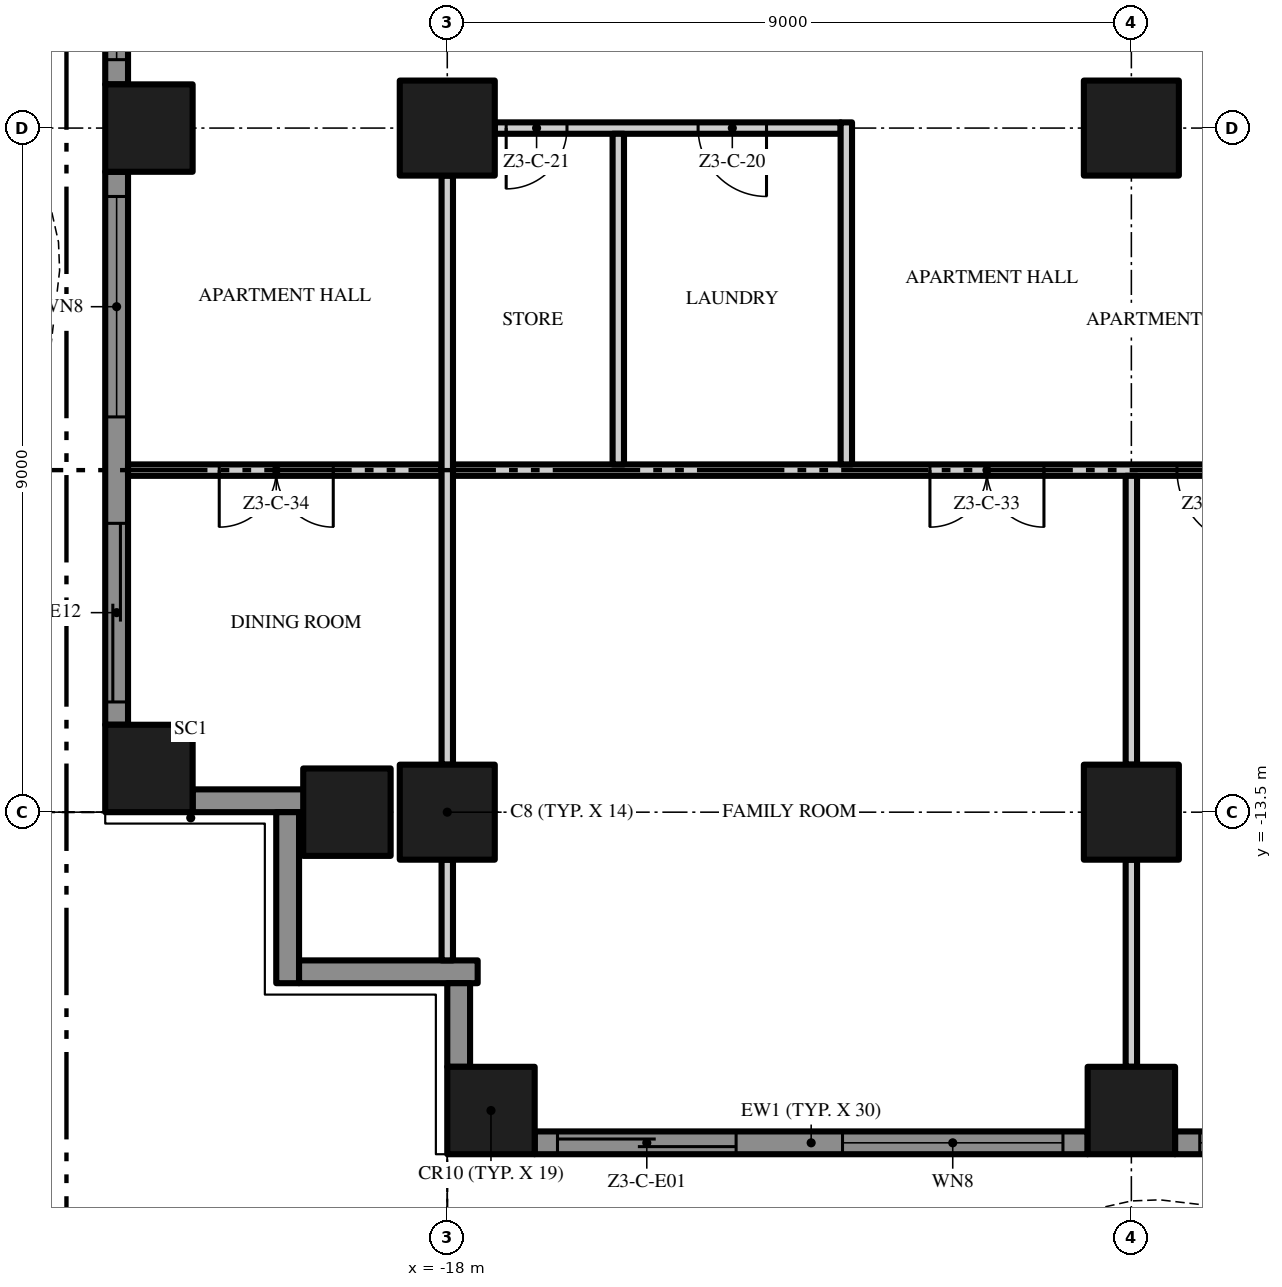
"""IFC4 building model, lengths in metres.
Left out: names, types, materials, properties, quantities, classifications, styles, units other than length and angle.
Written with IfcOpenShell. Run it as: python <this file> out.ifc"""

import sys

from ifc_helpers import new_model, si_unit, direction, frame, frame_2d, origin, origin_2d, place, context, subcontext, project, spatial, polyline, rectangle, outline, extrude, element, fill, save


model = new_model("IFC4")
c1 = context("Model", 3, precision=1e-05, world=origin(), true_north=direction((0.0, 1.0)))
c2 = subcontext(c1, "Body", "Model", "MODEL_VIEW")
j1 = project(units=[si_unit("LENGTHUNIT", "METRE"), si_unit("PLANEANGLEUNIT", "RADIAN")], contexts=[c1])
p1 = place(None, origin())
s1 = spatial("IfcSite", under=j1, at=p1, CompositionType="ELEMENT")
p2 = place(p1, origin())
s2 = spatial("IfcBuilding", under=s1, at=p2, CompositionType="ELEMENT")
p3 = place(p2, frame((0.0, 0.0, 147.8)))
s3 = spatial("IfcBuildingStorey", under=s2, at=p3, CompositionType="ELEMENT", Elevation=147.8)
p4 = place(p3, frame((-18.0, -13.5, 0.0), z_axis=(0.0, 0.0, 1.0), x_axis=(1.0, 0.0, 0.0)))
e1 = element("IfcColumn", 1, at=p4, inside=s3, PredefinedType="COLUMN", context=c2, shape_type="SweptSolid", body=[
    extrude(rectangle(XDim=1.25, YDim=1.25, at=origin_2d()), origin(), (0.0, 0.0, 1.0), 3.5),
])
p5 = place(p3, frame((-17.425, -17.425, 0.0), z_axis=(0.0, 0.0, 1.0), x_axis=(1.0, 0.0, 0.0)))
e2 = element("IfcColumn", 2, at=p5, inside=s3, PredefinedType="COLUMN", context=c2, shape_type="SweptSolid", body=[
    extrude(rectangle(XDim=1.15, YDim=1.15, at=origin_2d()), origin(), (0.0, 0.0, 1.0), 3.5),
])
p6 = place(p3, frame((-18.0, -4.5, 0.0), z_axis=(0.0, 0.0, 1.0), x_axis=(1.0, 0.0, 0.0)))
e3 = element("IfcColumn", 3, at=p6, inside=s3, PredefinedType="COLUMN", context=c2, shape_type="SweptSolid", body=[
    extrude(rectangle(XDim=1.25, YDim=1.25, at=origin_2d()), origin(), (0.0, 0.0, 1.0), 3.5),
])
for number, where, z_axis, x_axis in (
    (4, (-21.925, -12.925, 0.0), (0.0, 0.0, 1.0), (1.0, 0.0, 0.0)),
    (5, (-19.32, -13.5, 0.0), (0.0, 0.0, 1.0), (1.0, 0.0, 0.0)),
    (6, (-21.925, -4.5, 0.0), (0.0, 0.0, 1.0), (1.0, 0.0, 0.0)),
):
    element("IfcColumn", number, at=place(p3, frame(where, z_axis=z_axis, x_axis=x_axis)), inside=s3, PredefinedType="COLUMN", context=c2, shape_type="SweptSolid", body=[
        extrude(rectangle(XDim=1.15, YDim=1.15, at=origin_2d()), origin(), (0.0, 0.0, 1.0), 3.5),
    ])
p7 = place(p3, frame((-9.0, -13.5, 0.0), z_axis=(0.0, 0.0, 1.0), x_axis=(1.0, 0.0, 0.0)))
e7 = element("IfcColumn", 7, at=p7, inside=s3, PredefinedType="COLUMN", context=c2, shape_type="SweptSolid", body=[
    extrude(rectangle(XDim=1.25, YDim=1.25, at=origin_2d()), origin(), (0.0, 0.0, 1.0), 3.5),
])
p8 = place(p3, frame((-9.0, -17.425, 0.0), z_axis=(0.0, 0.0, 1.0), x_axis=(1.0, 0.0, 0.0)))
e8 = element("IfcColumn", 8, at=p8, inside=s3, PredefinedType="COLUMN", context=c2, shape_type="SweptSolid", body=[
    extrude(rectangle(XDim=1.15, YDim=1.15, at=origin_2d()), origin(), (0.0, 0.0, 1.0), 3.5),
])
p9 = place(p3, frame((-9.0, -4.5, 0.0), z_axis=(0.0, 0.0, 1.0), x_axis=(1.0, 0.0, 0.0)))
e9 = element("IfcColumn", 9, at=p9, inside=s3, PredefinedType="COLUMN", context=c2, shape_type="SweptSolid", body=[
    extrude(rectangle(XDim=1.25, YDim=1.25, at=origin_2d()), origin(), (0.0, 0.0, 1.0), 3.5),
])
p10 = place(p3, frame((-9.575, -17.85, 0.0), z_axis=(0.0, 0.0, 1.0), x_axis=(-1.0, 0.0, 0.0)))
e10 = element("IfcWall", 10, at=p10, inside=s3, PredefinedType="SOLIDWALL", context=c2, shape_type="SweptSolid", body=[
    extrude(rectangle(XDim=7.275, YDim=0.3, at=frame_2d((3.638, 0.0))), origin(), (0.0, 0.0, 1.0), 3.5),
])
p11 = place(p10, frame((4.625, 0.0, 0.0)))
e11 = element("IfcOpeningElement", 11, at=p11, cuts=e10, PredefinedType="OPENING", context=c2, shape_type="SweptSolid", body=[
    extrude(rectangle(XDim=2.35, YDim=2.4, at=frame_2d((1.175, 1.2))), frame((0.0, 0.16, 0.0), z_axis=(0.0, -1.0, 0.0), x_axis=(1.0, 0.0, 0.0)), (0.0, 0.0, 1.0), 0.32),
])
p12 = place(p10, frame((0.325, 0.0, 0.45)))
e12 = element("IfcOpeningElement", 12, at=p12, cuts=e10, PredefinedType="OPENING", context=c2, shape_type="SweptSolid", body=[
    extrude(rectangle(XDim=2.9, YDim=2.65, at=frame_2d((1.45, 1.325))), frame((0.0, 0.16, 0.0), z_axis=(0.0, -1.0, 0.0), x_axis=(1.0, 0.0, 0.0)), (0.0, 0.0, 1.0), 0.32),
])
p13 = place(p3, frame((-0.575, -17.85, 0.0), z_axis=(0.0, 0.0, 1.0), x_axis=(-1.0, 0.0, 0.0)))
e13 = element("IfcWall", 13, at=p13, inside=s3, PredefinedType="SOLIDWALL", context=c2, shape_type="SweptSolid", body=[
    extrude(rectangle(XDim=7.85, YDim=0.3, at=frame_2d((3.925, 0.0))), origin(), (0.0, 0.0, 1.0), 3.5),
])
p14 = place(p13, frame((4.625, 0.0, 0.45)))
e14 = element("IfcOpeningElement", 14, at=p14, cuts=e13, PredefinedType="OPENING", context=c2, shape_type="SweptSolid", body=[
    extrude(rectangle(XDim=2.9, YDim=2.65, at=frame_2d((1.45, 1.325))), frame((0.0, 0.16, 0.0), z_axis=(0.0, -1.0, 0.0), x_axis=(1.0, 0.0, 0.0)), (0.0, 0.0, 1.0), 0.32),
])
p15 = place(p13, frame((0.325, 0.0, 0.0)))
e15 = element("IfcOpeningElement", 15, at=p15, cuts=e13, PredefinedType="OPENING", context=c2, shape_type="SweptSolid", body=[
    extrude(rectangle(XDim=2.9, YDim=2.4, at=frame_2d((1.45, 1.2))), frame((0.0, 0.16, 0.0), z_axis=(0.0, -1.0, 0.0), x_axis=(1.0, 0.0, 0.0)), (0.0, 0.0, 1.0), 0.32),
])
p16 = place(p3, frame((-22.35, -3.925, 0.0), z_axis=(0.0, 0.0, 1.0), x_axis=(0.0, 1.0, 0.0)))
e16 = element("IfcWall", 16, at=p16, inside=s3, PredefinedType="SOLIDWALL", context=c2, shape_type="SweptSolid", body=[
    extrude(rectangle(XDim=7.85, YDim=0.3, at=frame_2d((3.925, 0.0))), origin(), (0.0, 0.0, 1.0), 3.5),
])
p17 = place(p16, frame((4.625, 0.0, 0.0)))
e17 = element("IfcOpeningElement", 17, at=p17, cuts=e16, PredefinedType="OPENING", context=c2, shape_type="SweptSolid", body=[
    extrude(rectangle(XDim=2.9, YDim=2.4, at=frame_2d((1.45, 1.2))), frame((0.0, 0.16, 0.0), z_axis=(0.0, -1.0, 0.0), x_axis=(1.0, 0.0, 0.0)), (0.0, 0.0, 1.0), 0.32),
])
p18 = place(p16, frame((0.325, 0.0, 0.45)))
e18 = element("IfcOpeningElement", 18, at=p18, cuts=e16, PredefinedType="OPENING", context=c2, shape_type="SweptSolid", body=[
    extrude(rectangle(XDim=2.9, YDim=2.65, at=frame_2d((1.45, 1.325))), frame((0.0, 0.16, 0.0), z_axis=(0.0, -1.0, 0.0), x_axis=(1.0, 0.0, 0.0)), (0.0, 0.0, 1.0), 0.32),
])
p19 = place(p3, frame((-22.35, -12.35, 0.0), z_axis=(0.0, 0.0, 1.0), x_axis=(0.0, 1.0, 0.0)))
e19 = element("IfcWall", 19, at=p19, inside=s3, PredefinedType="SOLIDWALL", context=c2, shape_type="SweptSolid", body=[
    extrude(rectangle(XDim=7.275, YDim=0.3, at=frame_2d((3.638, 0.0))), origin(), (0.0, 0.0, 1.0), 3.5),
])
p20 = place(p19, frame((4.05, 0.0, 0.45)))
e20 = element("IfcOpeningElement", 20, at=p20, cuts=e19, PredefinedType="OPENING", context=c2, shape_type="SweptSolid", body=[
    extrude(rectangle(XDim=2.9, YDim=2.65, at=frame_2d((1.45, 1.325))), frame((0.0, 0.16, 0.0), z_axis=(0.0, -1.0, 0.0), x_axis=(1.0, 0.0, 0.0)), (0.0, 0.0, 1.0), 0.32),
])
p21 = place(p19, frame((0.3, 0.0, 0.0)))
e21 = element("IfcOpeningElement", 21, at=p21, cuts=e19, PredefinedType="OPENING", context=c2, shape_type="SweptSolid", body=[
    extrude(rectangle(XDim=2.35, YDim=2.4, at=frame_2d((1.175, 1.2))), frame((0.0, 0.16, 0.0), z_axis=(0.0, -1.0, 0.0), x_axis=(1.0, 0.0, 0.0)), (0.0, 0.0, 1.0), 0.32),
])
p22 = place(p3, frame((-19.85, -13.35, 0.0), z_axis=(0.0, 0.0, 1.0), x_axis=(-1.0, 0.0, 0.0)))
e22 = element("IfcWall", 22, at=p22, inside=s3, PredefinedType="SOLIDWALL", context=c2, shape_type="SweptSolid", body=[
    extrude(rectangle(XDim=1.5, YDim=0.3, at=frame_2d((0.75, 0.0))), origin(), (0.0, 0.0, 1.0), 3.5),
])
p23 = place(p3, frame((-20.1, -15.75, 0.0), z_axis=(0.0, 0.0, 1.0), x_axis=(0.0, 1.0, 0.0)))
e23 = element("IfcWall", 23, at=p23, inside=s3, PredefinedType="SOLIDWALL", context=c2, shape_type="SweptSolid", body=[
    extrude(rectangle(XDim=2.25, YDim=0.3, at=frame_2d((1.125, 0.0))), origin(), (0.0, 0.0, 1.0), 3.5),
])
p24 = place(p3, frame((-17.6, -15.6, 0.0), z_axis=(0.0, 0.0, 1.0), x_axis=(-1.0, 0.0, 0.0)))
e24 = element("IfcWall", 24, at=p24, inside=s3, PredefinedType="SOLIDWALL", context=c2, shape_type="SweptSolid", body=[
    extrude(rectangle(XDim=2.35, YDim=0.3, at=frame_2d((1.175, 0.0))), origin(), (0.0, 0.0, 1.0), 3.5),
])
p25 = place(p3, frame((-17.85, -16.85, 0.0), z_axis=(0.0, 0.0, 1.0), x_axis=(0.0, 1.0, 0.0)))
e25 = element("IfcWall", 25, at=p25, inside=s3, PredefinedType="SOLIDWALL", context=c2, shape_type="SweptSolid", body=[
    extrude(rectangle(XDim=1.1, YDim=0.3, at=frame_2d((0.55, 0.0))), origin(), (0.0, 0.0, 1.0), 3.5),
])
p26 = place(p3, origin())
e26 = element("IfcWall", 26, at=p26, inside=s3, PredefinedType="USERDEFINED", context=c2, shape_type="SweptSolid", body=[
    extrude(outline(polyline([(-18.0, -20.649), (-16.5, -20.985), (-16.125, -21.0), (-15.0, -20.869), (-13.5, -20.345), (-12.0, -19.612), (-10.5, -18.951), (-9.0, -18.615), (-8.625, -18.6), (-7.5, -18.731), (-6.0, -19.255), (-4.5, -19.988), (-3.0, -20.649), (-1.5, -20.985), (-1.125, -21.0), (0.0, -20.869), (1.5, -20.345), (3.0, -19.612), (4.5, -18.951), (6.0, -18.615), (6.375, -18.6), (7.5, -18.731), (9.0, -19.255), (10.5, -19.988), (12.0, -20.649), (13.5, -20.985), (13.875, -21.0), (15.0, -20.869), (16.5, -20.345), (18.0, -19.612), (17.89, -19.388), (16.404, -20.114), (14.944, -20.624), (13.865, -20.749), (13.533, -20.736), (12.079, -20.41), (10.605, -19.761), (9.096, -19.024), (7.556, -18.486), (6.385, -18.349), (5.967, -18.366), (4.421, -18.713), (2.895, -19.385), (1.404, -20.114), (-0.056, -20.624), (-1.135, -20.749), (-1.467, -20.736), (-2.921, -20.41), (-4.395, -19.761), (-5.904, -19.024), (-7.444, -18.486), (-8.615, -18.349), (-9.033, -18.366), (-10.579, -18.713), (-12.105, -19.385), (-13.596, -20.114), (-15.056, -20.624), (-16.135, -20.749), (-16.467, -20.736), (-17.945, -20.405), (-18.0, -20.649)])), origin(), (0.0, 0.0, 1.0), 0.9),
])
p27 = place(p3, origin())
e27 = element("IfcWall", 27, at=p27, inside=s3, PredefinedType="USERDEFINED", context=c2, shape_type="SweptSolid", body=[
    extrude(outline(polyline([(-25.149, 18.0), (-25.485, 16.5), (-25.5, 16.125), (-25.369, 15.0), (-24.845, 13.5), (-24.112, 12.0), (-23.451, 10.5), (-23.115, 9.0), (-23.1, 8.625), (-23.231, 7.5), (-23.755, 6.0), (-24.488, 4.5), (-25.149, 3.0), (-25.485, 1.5), (-25.5, 1.125), (-25.369, 0.0), (-24.845, -1.5), (-24.112, -3.0), (-23.451, -4.5), (-23.115, -6.0), (-23.1, -6.375), (-23.231, -7.5), (-23.755, -9.0), (-24.488, -10.5), (-25.149, -12.0), (-25.485, -13.5), (-25.241, -13.555), (-24.91, -12.079), (-24.261, -10.605), (-23.524, -9.096), (-22.986, -7.556), (-22.849, -6.385), (-22.866, -5.967), (-23.213, -4.421), (-23.885, -2.895), (-24.614, -1.404), (-25.124, 0.056), (-25.249, 1.135), (-25.236, 1.467), (-24.91, 2.921), (-24.261, 4.395), (-23.524, 5.904), (-22.986, 7.444), (-22.849, 8.615), (-22.866, 9.033), (-23.213, 10.579), (-23.885, 12.105), (-24.614, 13.596), (-25.124, 15.056), (-25.249, 16.135), (-25.236, 16.467), (-24.905, 17.945), (-25.149, 18.0)])), origin(), (0.0, 0.0, 1.0), 0.9),
])
p28 = place(p3, frame((-18.075, -9.0, 0.0), z_axis=(0.0, 0.0, 1.0), x_axis=(-1.0, 0.0, 0.0)))
e28 = element("IfcWall", 28, at=p28, inside=s3, PredefinedType="PARTITIONING", context=c2, shape_type="SweptSolid", body=[
    extrude(rectangle(XDim=4.125, YDim=0.15, at=frame_2d((2.062, 0.0))), origin(), (0.0, 0.0, 1.0), 3.5),
])
p29 = place(p28, frame((1.425, 0.0, 0.0)))
e29 = element("IfcOpeningElement", 29, at=p29, cuts=e28, PredefinedType="OPENING", context=c2, shape_type="SweptSolid", body=[
    extrude(rectangle(XDim=1.5, YDim=2.4, at=frame_2d((0.75, 1.2))), frame((0.0, 0.085, 0.0), z_axis=(0.0, -1.0, 0.0), x_axis=(1.0, 0.0, 0.0)), (0.0, 0.0, 1.0), 0.17),
])
p30 = place(p3, frame((-6.825, -9.0, 0.0), z_axis=(0.0, 0.0, 1.0), x_axis=(-1.0, 0.0, 0.0)))
e30 = element("IfcWall", 30, at=p30, inside=s3, PredefinedType="PARTITIONING", context=c2, shape_type="SweptSolid", body=[
    extrude(rectangle(XDim=11.1, YDim=0.15, at=frame_2d((5.55, 0.0))), origin(), (0.0, 0.0, 1.0), 3.5),
])
p31 = place(p30, frame((0.575, 0.0, 0.0)))
e31 = element("IfcOpeningElement", 31, at=p31, cuts=e30, PredefinedType="OPENING", context=c2, shape_type="SweptSolid", body=[
    extrude(rectangle(XDim=1.0, YDim=2.4, at=frame_2d((0.5, 1.2))), frame((0.0, 0.085, 0.0), z_axis=(0.0, -1.0, 0.0), x_axis=(1.0, 0.0, 0.0)), (0.0, 0.0, 1.0), 0.17),
])
p32 = place(p30, frame((3.325, 0.0, 0.0)))
e32 = element("IfcOpeningElement", 32, at=p32, cuts=e30, PredefinedType="OPENING", context=c2, shape_type="SweptSolid", body=[
    extrude(rectangle(XDim=1.5, YDim=2.4, at=frame_2d((0.75, 1.2))), frame((0.0, 0.085, 0.0), z_axis=(0.0, -1.0, 0.0), x_axis=(1.0, 0.0, 0.0)), (0.0, 0.0, 1.0), 0.17),
])
p33 = place(p3, frame((-12.825, -4.5, 0.0), z_axis=(0.0, 0.0, 1.0), x_axis=(-1.0, 0.0, 0.0)))
e33 = element("IfcWall", 33, at=p33, inside=s3, PredefinedType="PARTITIONING", context=c2, shape_type="SweptSolid", body=[
    extrude(rectangle(XDim=4.55, YDim=0.15, at=frame_2d((2.275, 0.0))), origin(), (0.0, 0.0, 1.0), 3.5),
])
p34 = place(p33, frame((0.975, 0.0, 0.0)))
e34 = element("IfcOpeningElement", 34, at=p34, cuts=e33, PredefinedType="OPENING", context=c2, shape_type="SweptSolid", body=[
    extrude(rectangle(XDim=0.9, YDim=2.1, at=frame_2d((0.45, 1.05))), frame((0.0, 0.085, 0.0), z_axis=(0.0, -1.0, 0.0), x_axis=(1.0, 0.0, 0.0)), (0.0, 0.0, 1.0), 0.17),
])
p35 = place(p33, frame((3.6, 0.0, 0.0)))
e35 = element("IfcOpeningElement", 35, at=p35, cuts=e33, PredefinedType="OPENING", context=c2, shape_type="SweptSolid", body=[
    extrude(rectangle(XDim=0.8, YDim=2.0, at=frame_2d((0.4, 1.0))), frame((0.0, 0.085, 0.0), z_axis=(0.0, -1.0, 0.0), x_axis=(1.0, 0.0, 0.0)), (0.0, 0.0, 1.0), 0.17),
])
p36 = place(p3, frame((-18.0, -15.45, 0.0), z_axis=(0.0, 0.0, 1.0), x_axis=(0.0, 1.0, 0.0)))
e36 = element("IfcWall", 36, at=p36, inside=s3, PredefinedType="PARTITIONING", context=c2, shape_type="SweptSolid", body=[
    extrude(rectangle(XDim=1.325, YDim=0.15, at=frame_2d((0.662, 0.0))), origin(), (0.0, 0.0, 1.0), 3.5),
])
p37 = place(p3, frame((-18.0, -12.875, 0.0), z_axis=(0.0, 0.0, 1.0), x_axis=(0.0, 1.0, 0.0)))
e37 = element("IfcWall", 37, at=p37, inside=s3, PredefinedType="PARTITIONING", context=c2, shape_type="SweptSolid", body=[
    extrude(rectangle(XDim=7.75, YDim=0.15, at=frame_2d((3.875, 0.0))), origin(), (0.0, 0.0, 1.0), 3.5),
])
p38 = place(p3, frame((-15.75, -8.925, 0.0), z_axis=(0.0, 0.0, 1.0), x_axis=(0.0, 1.0, 0.0)))
e38 = element("IfcWall", 38, at=p38, inside=s3, PredefinedType="PARTITIONING", context=c2, shape_type="SweptSolid", body=[
    extrude(rectangle(XDim=4.35, YDim=0.15, at=frame_2d((2.175, 0.0))), origin(), (0.0, 0.0, 1.0), 3.5),
])
p39 = place(p3, frame((-12.75, -8.925, 0.0), z_axis=(0.0, 0.0, 1.0), x_axis=(0.0, 1.0, 0.0)))
e39 = element("IfcWall", 39, at=p39, inside=s3, PredefinedType="PARTITIONING", context=c2, shape_type="SweptSolid", body=[
    extrude(rectangle(XDim=4.5, YDim=0.15, at=frame_2d((2.25, 0.0))), origin(), (0.0, 0.0, 1.0), 3.5),
])
p40 = place(p3, frame((-9.0, -16.85, 0.0), z_axis=(0.0, 0.0, 1.0), x_axis=(0.0, 1.0, 0.0)))
e40 = element("IfcWall", 40, at=p40, inside=s3, PredefinedType="PARTITIONING", context=c2, shape_type="SweptSolid", body=[
    extrude(rectangle(XDim=2.725, YDim=0.15, at=frame_2d((1.363, 0.0))), origin(), (0.0, 0.0, 1.0), 3.5),
])
p41 = place(p3, frame((-9.0, -12.875, 0.0), z_axis=(0.0, 0.0, 1.0), x_axis=(0.0, 1.0, 0.0)))
e41 = element("IfcWall", 41, at=p41, inside=s3, PredefinedType="PARTITIONING", context=c2, shape_type="SweptSolid", body=[
    extrude(rectangle(XDim=3.8, YDim=0.15, at=frame_2d((1.9, 0.0))), origin(), (0.0, 0.0, 1.0), 3.5),
])
p42 = place(p11, origin())
e42 = element("IfcDoor", 42, at=p42, inside=s3, OperationType="SINGLE_SWING_LEFT", PredefinedType="DOOR", context=c2, shape_type="SweptSolid", body=[
    extrude(rectangle(XDim=2.35, YDim=2.4, at=frame_2d((1.175, 1.2))), frame((0.0, 0.025, 0.0), z_axis=(0.0, -1.0, 0.0), x_axis=(1.0, 0.0, 0.0)), (0.0, 0.0, 1.0), 0.05),
])
fill(e11, e42)
p43 = place(p12, origin())
e43 = element("IfcWindow", 43, at=p43, inside=s3, PartitioningType="SINGLE_PANEL", PredefinedType="WINDOW", context=c2, shape_type="SweptSolid", body=[
    extrude(rectangle(XDim=2.9, YDim=2.65, at=frame_2d((1.45, 1.325))), frame((0.0, 0.03, 0.0), z_axis=(0.0, -1.0, 0.0), x_axis=(1.0, 0.0, 0.0)), (0.0, 0.0, 1.0), 0.06),
])
fill(e12, e43)
p44 = place(p14, origin())
e44 = element("IfcWindow", 44, at=p44, inside=s3, PartitioningType="SINGLE_PANEL", PredefinedType="WINDOW", context=c2, shape_type="SweptSolid", body=[
    extrude(rectangle(XDim=2.9, YDim=2.65, at=frame_2d((1.45, 1.325))), frame((0.0, 0.03, 0.0), z_axis=(0.0, -1.0, 0.0), x_axis=(1.0, 0.0, 0.0)), (0.0, 0.0, 1.0), 0.06),
])
fill(e14, e44)
p45 = place(p18, origin())
e45 = element("IfcWindow", 45, at=p45, inside=s3, PartitioningType="SINGLE_PANEL", PredefinedType="WINDOW", context=c2, shape_type="SweptSolid", body=[
    extrude(rectangle(XDim=2.9, YDim=2.65, at=frame_2d((1.45, 1.325))), frame((0.0, 0.03, 0.0), z_axis=(0.0, -1.0, 0.0), x_axis=(1.0, 0.0, 0.0)), (0.0, 0.0, 1.0), 0.06),
])
fill(e18, e45)
p46 = place(p20, origin())
e46 = element("IfcWindow", 46, at=p46, inside=s3, PartitioningType="SINGLE_PANEL", PredefinedType="WINDOW", context=c2, shape_type="SweptSolid", body=[
    extrude(rectangle(XDim=2.9, YDim=2.65, at=frame_2d((1.45, 1.325))), frame((0.0, 0.03, 0.0), z_axis=(0.0, -1.0, 0.0), x_axis=(1.0, 0.0, 0.0)), (0.0, 0.0, 1.0), 0.06),
])
fill(e20, e46)
p47 = place(p21, origin())
e47 = element("IfcDoor", 47, at=p47, inside=s3, OperationType="SINGLE_SWING_LEFT", PredefinedType="DOOR", context=c2, shape_type="SweptSolid", body=[
    extrude(rectangle(XDim=2.35, YDim=2.4, at=frame_2d((1.175, 1.2))), frame((0.0, 0.025, 0.0), z_axis=(0.0, -1.0, 0.0), x_axis=(1.0, 0.0, 0.0)), (0.0, 0.0, 1.0), 0.05),
])
fill(e21, e47)
p48 = place(p34, origin())
e48 = element("IfcDoor", 48, at=p48, inside=s3, OperationType="SINGLE_SWING_LEFT", PredefinedType="DOOR", context=c2, shape_type="SweptSolid", body=[
    extrude(rectangle(XDim=0.9, YDim=2.1, at=frame_2d((0.45, 1.05))), frame((0.0, 0.025, 0.0), z_axis=(0.0, -1.0, 0.0), x_axis=(1.0, 0.0, 0.0)), (0.0, 0.0, 1.0), 0.05),
])
fill(e34, e48)
p49 = place(p35, origin())
e49 = element("IfcDoor", 49, at=p49, inside=s3, OperationType="SINGLE_SWING_RIGHT", PredefinedType="DOOR", context=c2, shape_type="SweptSolid", body=[
    extrude(rectangle(XDim=0.8, YDim=2.0, at=frame_2d((0.4, 1.0))), frame((0.0, 0.025, 0.0), z_axis=(0.0, -1.0, 0.0), x_axis=(1.0, 0.0, 0.0)), (0.0, 0.0, 1.0), 0.05),
])
fill(e35, e49)
p50 = place(p31, origin())
e50 = element("IfcDoor", 50, at=p50, inside=s3, OperationType="SINGLE_SWING_LEFT", PredefinedType="DOOR", context=c2, shape_type="SweptSolid", body=[
    extrude(rectangle(XDim=1.0, YDim=2.4, at=frame_2d((0.5, 1.2))), frame((0.0, 0.025, 0.0), z_axis=(0.0, -1.0, 0.0), x_axis=(1.0, 0.0, 0.0)), (0.0, 0.0, 1.0), 0.05),
])
fill(e31, e50)
p51 = place(p32, origin())
e51 = element("IfcDoor", 51, at=p51, inside=s3, OperationType="DOUBLE_DOOR_SINGLE_SWING", PredefinedType="DOOR", context=c2, shape_type="SweptSolid", body=[
    extrude(rectangle(XDim=1.5, YDim=2.4, at=frame_2d((0.75, 1.2))), frame((0.0, 0.025, 0.0), z_axis=(0.0, -1.0, 0.0), x_axis=(1.0, 0.0, 0.0)), (0.0, 0.0, 1.0), 0.05),
])
fill(e32, e51)
p52 = place(p29, origin())
e52 = element("IfcDoor", 52, at=p52, inside=s3, OperationType="DOUBLE_DOOR_SINGLE_SWING", PredefinedType="DOOR", context=c2, shape_type="SweptSolid", body=[
    extrude(rectangle(XDim=1.5, YDim=2.4, at=frame_2d((0.75, 1.2))), frame((0.0, 0.025, 0.0), z_axis=(0.0, -1.0, 0.0), x_axis=(1.0, 0.0, 0.0)), (0.0, 0.0, 1.0), 0.05),
])
fill(e29, e52)
save(model, sys.argv[1])
